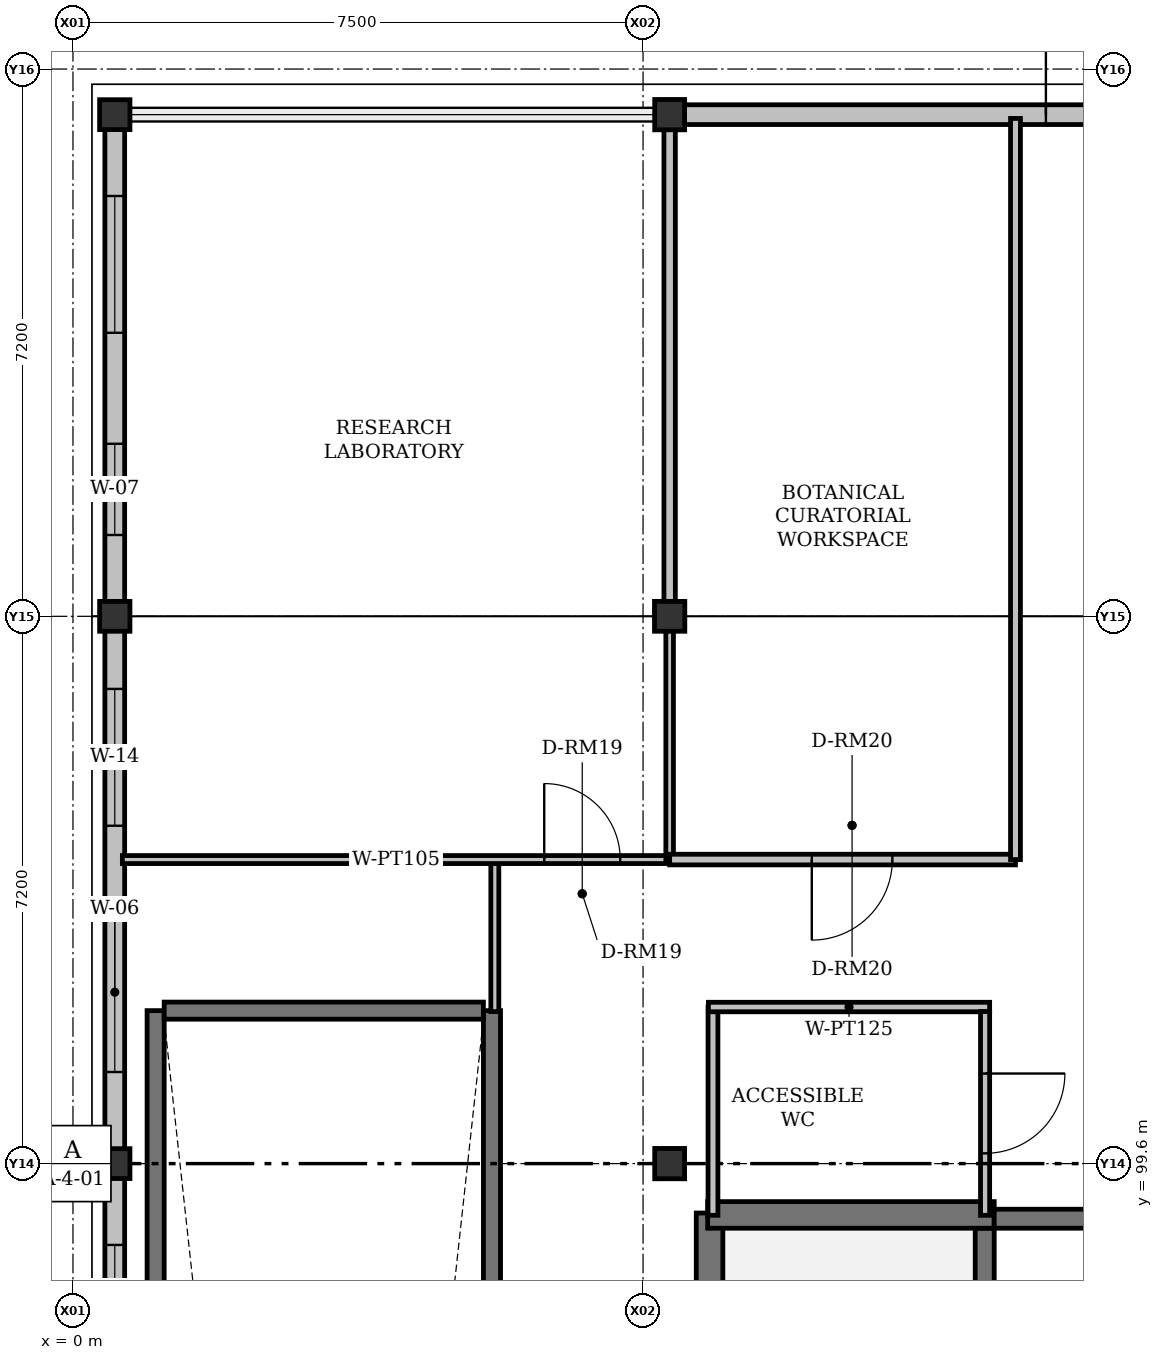
"""IFC4 building model, lengths in metres.
Left out: names, types, materials, properties, quantities, classifications, styles, units other than length and angle.
Written with IfcOpenShell. Run it as: python <this file> out.ifc"""

import sys

from ifc_helpers import new_model, si_unit, direction, frame, frame_2d, origin, origin_2d, place, context, subcontext, project, spatial, rectangle, i_section, extrude, element, fill, save


model = new_model("IFC4")
c1 = context("Model", 3, precision=1e-05, world=origin(), true_north=direction((0.0, 1.0)))
c2 = subcontext(c1, "Body", "Model", "MODEL_VIEW")
j1 = project(units=[si_unit("LENGTHUNIT", "METRE"), si_unit("PLANEANGLEUNIT", "RADIAN")], contexts=[c1])
p1 = place(None, origin())
s1 = spatial("IfcSite", under=j1, at=p1, CompositionType="ELEMENT")
p2 = place(p1, origin())
s2 = spatial("IfcBuilding", under=s1, at=p2, CompositionType="ELEMENT")
p3 = place(p2, origin())
s3 = spatial("IfcBuildingStorey", under=s2, at=p3, CompositionType="ELEMENT", Elevation=0.0)
for number, where, z_axis, x_axis in (
    (1, (0.55, 99.6, 0.0), (0.0, 0.0, 1.0), (1.0, 0.0, 0.0)),
    (2, (7.85, 99.6, 0.0), (0.0, 0.0, 1.0), (0.0, 1.0, 0.0)),
    (3, (0.55, 106.8, 0.0), (0.0, 0.0, 1.0), (1.0, 0.0, 0.0)),
    (4, (7.85, 106.8, 0.0), (0.0, 0.0, 1.0), (1.0, 0.0, 0.0)),
    (5, (0.55, 113.4, 0.0), (0.0, 0.0, 1.0), (1.0, 0.0, 0.0)),
    (6, (7.85, 113.4, 0.0), (0.0, 0.0, 1.0), (0.0, 1.0, 0.0)),
):
    element("IfcColumn", number, at=place(p3, frame(where, z_axis=z_axis, x_axis=x_axis)), inside=s3, PredefinedType="COLUMN", context=c2, shape_type="SweptSolid", body=[
        extrude(i_section(OverallWidth=0.399, OverallDepth=0.393, WebThickness=0.023, FlangeThickness=0.036, FilletRadius=0.015, at=origin_2d()), origin(), (0.0, 0.0, 1.0), 5.4),
    ])
p4 = place(p3, frame((0.55, 92.4, 0.0), z_axis=(0.0, 0.0, 1.0), x_axis=(0.0, 1.0, 0.0)))
e7 = element("IfcWall", 7, at=p4, inside=s3, PredefinedType="SOLIDWALL", context=c2, shape_type="SweptSolid", body=[
    extrude(rectangle(XDim=7.2, YDim=0.26, at=frame_2d((3.6, 0.0))), origin(), (0.0, 0.0, 1.0), 4.777),
])
p5 = place(p4, frame((1.07, 0.0, 0.92)))
e8 = element("IfcOpeningElement", 8, at=p5, cuts=e7, PredefinedType="OPENING", context=c2, shape_type="SweptSolid", body=[
    extrude(rectangle(XDim=1.8, YDim=1.4, at=frame_2d((0.9, 0.7))), frame((0.0, 0.13, 0.0), z_axis=(0.0, -1.0, 0.0), x_axis=(1.0, 0.0, 0.0)), (0.0, 0.0, 1.0), 0.26),
])
p6 = place(p4, frame((4.93, 0.0, 0.92)))
e9 = element("IfcOpeningElement", 9, at=p6, cuts=e7, PredefinedType="OPENING", context=c2, shape_type="SweptSolid", body=[
    extrude(rectangle(XDim=1.2, YDim=1.7, at=frame_2d((0.6, 0.85))), frame((0.0, 0.13, 0.0), z_axis=(0.0, -1.0, 0.0), x_axis=(1.0, 0.0, 0.0)), (0.0, 0.0, 1.0), 0.26),
])
p7 = place(p3, frame((0.55, 99.6, 0.0), z_axis=(0.0, 0.0, 1.0), x_axis=(0.0, 1.0, 0.0)))
e10 = element("IfcWall", 10, at=p7, inside=s3, PredefinedType="SOLIDWALL", context=c2, shape_type="SweptSolid", body=[
    extrude(rectangle(XDim=7.2, YDim=0.26, at=frame_2d((3.6, 0.0))), origin(), (0.0, 0.0, 1.0), 4.777),
])
p8 = place(p7, frame((1.205, 0.0, 0.92)))
e11 = element("IfcOpeningElement", 11, at=p8, cuts=e10, PredefinedType="OPENING", context=c2, shape_type="SweptSolid", body=[
    extrude(rectangle(XDim=2.1, YDim=1.4, at=frame_2d((1.05, 0.7))), frame((0.0, 0.13, 0.0), z_axis=(0.0, -1.0, 0.0), x_axis=(1.0, 0.0, 0.0)), (0.0, 0.0, 1.0), 0.26),
])
p9 = place(p7, frame((4.445, 0.0, 0.92)))
e12 = element("IfcOpeningElement", 12, at=p9, cuts=e10, PredefinedType="OPENING", context=c2, shape_type="SweptSolid", body=[
    extrude(rectangle(XDim=1.8, YDim=1.7, at=frame_2d((0.9, 0.85))), frame((0.0, 0.13, 0.0), z_axis=(0.0, -1.0, 0.0), x_axis=(1.0, 0.0, 0.0)), (0.0, 0.0, 1.0), 0.26),
])
p10 = place(p3, frame((0.55, 106.8, 0.0), z_axis=(0.0, 0.0, 1.0), x_axis=(0.0, 1.0, 0.0)))
e13 = element("IfcWall", 13, at=p10, inside=s3, PredefinedType="SOLIDWALL", context=c2, shape_type="SweptSolid", body=[
    extrude(rectangle(XDim=6.6, YDim=0.26, at=frame_2d((3.3, 0.0))), origin(), (0.0, 0.0, 1.0), 4.777),
])
p11 = place(p10, frame((1.07, 0.0, 0.92)))
e14 = element("IfcOpeningElement", 14, at=p11, cuts=e13, PredefinedType="OPENING", context=c2, shape_type="SweptSolid", body=[
    extrude(rectangle(XDim=1.2, YDim=1.55, at=frame_2d((0.6, 0.775))), frame((0.0, 0.13, 0.0), z_axis=(0.0, -1.0, 0.0), x_axis=(1.0, 0.0, 0.0)), (0.0, 0.0, 1.0), 0.26),
])
p12 = place(p10, frame((3.73, 0.0, 0.92)))
e15 = element("IfcOpeningElement", 15, at=p12, cuts=e13, PredefinedType="OPENING", context=c2, shape_type="SweptSolid", body=[
    extrude(rectangle(XDim=1.8, YDim=1.7, at=frame_2d((0.9, 0.85))), frame((0.0, 0.13, 0.0), z_axis=(0.0, -1.0, 0.0), x_axis=(1.0, 0.0, 0.0)), (0.0, 0.0, 1.0), 0.26),
])
p13 = place(p3, frame((7.85, 113.4, 0.0), z_axis=(0.0, 0.0, 1.0), x_axis=(1.0, 0.0, 0.0)))
e16 = element("IfcWall", 16, at=p13, inside=s3, PredefinedType="SOLIDWALL", context=c2, shape_type="SweptSolid", body=[
    extrude(rectangle(XDim=11.9, YDim=0.26, at=frame_2d((5.95, 0.0))), origin(), (0.0, 0.0, 1.0), 4.7),
])
p14 = place(p13, frame((4.95, 0.0, 0.0)))
e17 = element("IfcOpeningElement", 17, at=p14, cuts=e16, PredefinedType="OPENING", context=c2, shape_type="SweptSolid", body=[
    extrude(rectangle(XDim=2.0, YDim=2.4, at=frame_2d((1.0, 1.2))), frame((0.0, 0.13, 0.0), z_axis=(0.0, -1.0, 0.0), x_axis=(1.0, 0.0, 0.0)), (0.0, 0.0, 1.0), 0.26),
])
p15 = place(p3, frame((8.375, 90.775, 0.0), z_axis=(0.0, 0.0, 1.0), x_axis=(0.0, 1.0, 0.0)))
e18 = element("IfcWall", 18, at=p15, inside=s3, PredefinedType="SHEAR", context=c2, shape_type="SweptSolid", body=[
    extrude(rectangle(XDim=8.175, YDim=0.35, at=frame_2d((4.087, 0.0))), origin(), (0.0, 0.0, 1.0), 5.4),
])
p16 = place(p3, frame((11.995, 90.9, 0.0), z_axis=(0.0, 0.0, 1.0), x_axis=(0.0, 1.0, 0.0)))
e19 = element("IfcWall", 19, at=p16, inside=s3, PredefinedType="SHEAR", context=c2, shape_type="SweptSolid", body=[
    extrude(rectangle(XDim=7.85, YDim=0.25, at=frame_2d((3.925, 0.0))), origin(), (0.0, 0.0, 1.0), 5.4),
])
p17 = place(p3, frame((8.35, 98.925, 0.0), z_axis=(0.0, 0.0, 1.0), x_axis=(1.0, 0.0, 0.0)))
e20 = element("IfcWall", 20, at=p17, inside=s3, PredefinedType="SHEAR", context=c2, shape_type="SweptSolid", body=[
    extrude(rectangle(XDim=3.77, YDim=0.35, at=frame_2d((1.885, 0.0))), origin(), (0.0, 0.0, 1.0), 5.4),
])
p18 = place(p3, frame((12.12, 98.875, 0.0), z_axis=(0.0, 0.0, 1.0), x_axis=(1.0, 0.0, 0.0)))
e21 = element("IfcWall", 21, at=p18, inside=s3, PredefinedType="SHEAR", context=c2, shape_type="SweptSolid", body=[
    extrude(rectangle(XDim=4.03, YDim=0.25, at=frame_2d((2.015, 0.0))), origin(), (0.0, 0.0, 1.0), 5.4),
])
p19 = place(p18, frame((1.35, 0.0, 0.0)))
e22 = element("IfcOpeningElement", 22, at=p19, cuts=e21, PredefinedType="OPENING", context=c2, shape_type="SweptSolid", body=[
    extrude(rectangle(XDim=1.3, YDim=2.2, at=frame_2d((0.65, 1.1))), frame((0.0, 0.125, 0.0), z_axis=(0.0, -1.0, 0.0), x_axis=(1.0, 0.0, 0.0)), (0.0, 0.0, 1.0), 0.25),
])
for number, where, z_axis, x_axis in (
    (23, (1.087, 63.1, 0.0), (0.0, 0.0, 1.0), (0.0, 1.0, 0.0)),
    (24, (5.512, 63.1, 0.0), (0.0, 0.0, 1.0), (0.0, 1.0, 0.0)),
):
    element("IfcWall", number, at=place(p3, frame(where, z_axis=z_axis, x_axis=x_axis)), inside=s3, PredefinedType="SHEAR", context=c2, shape_type="SweptSolid", body=[
        extrude(rectangle(XDim=38.512, YDim=0.225, at=frame_2d((19.256, 0.0))), origin(), (0.0, 0.0, 1.0), 4.65),
    ])
p20 = place(p3, frame((1.2, 101.613, 0.0), z_axis=(0.0, 0.0, 1.0), x_axis=(1.0, 0.0, 0.0)))
e25 = element("IfcWall", 25, at=p20, inside=s3, PredefinedType="SHEAR", context=c2, shape_type="SweptSolid", body=[
    extrude(rectangle(XDim=4.2, YDim=0.225, at=frame_2d((2.1, 0.0))), origin(), (0.0, 0.0, 1.0), 4.65),
])
p21 = place(p3, frame((8.42, 98.92, 0.0), z_axis=(0.0, 0.0, 1.0), x_axis=(0.0, 1.0, 0.0)))
e26 = element("IfcWall", 26, at=p21, inside=s3, PredefinedType="PARTITIONING", context=c2, shape_type="SweptSolid", body=[
    extrude(rectangle(XDim=2.74, YDim=0.13, at=frame_2d((1.37, 0.0))), origin(), (0.0, 0.0, 1.0), 4.651),
])
p22 = place(p3, frame((8.36, 101.66, 0.0), z_axis=(0.0, 0.0, 1.0), x_axis=(1.0, 0.0, 0.0)))
e27 = element("IfcWall", 27, at=p22, inside=s3, PredefinedType="PARTITIONING", context=c2, shape_type="SweptSolid", body=[
    extrude(rectangle(XDim=3.7, YDim=0.125, at=frame_2d((1.85, 0.0))), origin(), (0.0, 0.0, 1.0), 5.15),
])
p23 = place(p3, frame((12.0, 101.6, 0.0), z_axis=(0.0, 0.0, 1.0), x_axis=(0.0, -1.0, 0.0)))
e28 = element("IfcWall", 28, at=p23, inside=s3, PredefinedType="PARTITIONING", context=c2, shape_type="SweptSolid", body=[
    extrude(rectangle(XDim=2.68, YDim=0.12, at=frame_2d((1.34, 0.0))), origin(), (0.0, 0.0, 1.0), 4.651),
])
p24 = place(p23, frame((0.815, 0.0, 0.0)))
e29 = element("IfcOpeningElement", 29, at=p24, cuts=e28, PredefinedType="OPENING", context=c2, shape_type="SweptSolid", body=[
    extrude(rectangle(XDim=1.05, YDim=2.1, at=frame_2d((0.525, 1.05))), frame((0.0, 0.06, 0.0), z_axis=(0.0, -1.0, 0.0), x_axis=(1.0, 0.0, 0.0)), (0.0, 0.0, 1.0), 0.12),
])
p25 = place(p3, frame((5.55, 101.6, 0.0), z_axis=(0.0, 0.0, 1.0), x_axis=(0.0, 1.0, 0.0)))
e30 = element("IfcWall", 30, at=p25, inside=s3, PredefinedType="PARTITIONING", context=c2, shape_type="SweptSolid", body=[
    extrude(rectangle(XDim=2.0, YDim=0.105, at=frame_2d((1.0, 0.0))), origin(), (0.0, 0.0, 1.0), 4.877),
])
p26 = place(p3, frame((0.65, 103.6, 0.0), z_axis=(0.0, 0.0, 1.0), x_axis=(1.0, 0.0, 0.0)))
e31 = element("IfcWall", 31, at=p26, inside=s3, PredefinedType="PARTITIONING", context=c2, shape_type="SweptSolid", body=[
    extrude(rectangle(XDim=7.2, YDim=0.105, at=frame_2d((3.6, 0.0))), origin(), (0.0, 0.0, 1.0), 4.727),
])
p27 = place(p26, frame((5.55, 0.0, 0.0)))
e32 = element("IfcOpeningElement", 32, at=p27, cuts=e31, PredefinedType="OPENING", context=c2, shape_type="SweptSolid", body=[
    extrude(rectangle(XDim=1.0, YDim=2.25, at=frame_2d((0.5, 1.125))), frame((0.0, 0.052, 0.0), z_axis=(0.0, -1.0, 0.0), x_axis=(1.0, 0.0, 0.0)), (0.0, 0.0, 1.0), 0.105),
])
p28 = place(p3, frame((7.85, 103.6, 0.0), z_axis=(0.0, 0.0, 1.0), x_axis=(0.0, 1.0, 0.0)))
e33 = element("IfcWall", 33, at=p28, inside=s3, PredefinedType="PARTITIONING", context=c2, shape_type="SweptSolid", body=[
    extrude(rectangle(XDim=3.008, YDim=0.1, at=frame_2d((1.504, 0.0))), origin(), (0.0, 0.0, 1.0), 4.727),
])
p29 = place(p3, frame((7.85, 106.991, 0.0), z_axis=(0.0, 0.0, 1.0), x_axis=(0.0, 1.0, 0.0)))
e34 = element("IfcWall", 34, at=p29, inside=s3, PredefinedType="PARTITIONING", context=c2, shape_type="SweptSolid", body=[
    extrude(rectangle(XDim=6.359, YDim=0.15, at=frame_2d((3.179, 0.0))), origin(), (0.0, 0.0, 1.0), 4.727),
])
p30 = place(p3, frame((12.4, 103.6, 0.0), z_axis=(0.0, 0.0, 1.0), x_axis=(-1.0, 0.0, 0.0)))
e35 = element("IfcWall", 35, at=p30, inside=s3, PredefinedType="PARTITIONING", context=c2, shape_type="SweptSolid", body=[
    extrude(rectangle(XDim=4.55, YDim=0.14, at=frame_2d((2.275, 0.0))), origin(), (0.0, 0.0, 1.0), 4.727),
])
p31 = place(p30, frame((1.62, 0.0, 0.0)))
e36 = element("IfcOpeningElement", 36, at=p31, cuts=e35, PredefinedType="OPENING", context=c2, shape_type="SweptSolid", body=[
    extrude(rectangle(XDim=1.06, YDim=2.25, at=frame_2d((0.53, 1.125))), frame((0.0, 0.07, 0.0), z_axis=(0.0, -1.0, 0.0), x_axis=(1.0, 0.0, 0.0)), (0.0, 0.0, 1.0), 0.14),
])
p32 = place(p3, frame((12.4, 113.35, 0.0), z_axis=(0.0, 0.0, 1.0), x_axis=(0.0, -1.0, 0.0)))
e37 = element("IfcWall", 37, at=p32, inside=s3, PredefinedType="PARTITIONING", context=c2, shape_type="SweptSolid", body=[
    extrude(rectangle(XDim=9.75, YDim=0.13, at=frame_2d((4.875, 0.0))), origin(), (0.0, 0.0, 1.0), 4.651),
])
p33 = place(p6, origin())
e38 = element("IfcWindow", 38, at=p33, inside=s3, PartitioningType="SINGLE_PANEL", PredefinedType="WINDOW", context=c2, shape_type="SweptSolid", body=[
    extrude(rectangle(XDim=1.2, YDim=1.7, at=frame_2d((0.6, 0.85))), frame((0.0, 0.03, 0.0), z_axis=(0.0, -1.0, 0.0), x_axis=(1.0, 0.0, 0.0)), (0.0, 0.0, 1.0), 0.06),
])
fill(e9, e38)
p34 = place(p8, origin())
e39 = element("IfcWindow", 39, at=p34, inside=s3, PartitioningType="DOUBLE_PANEL_VERTICAL", PredefinedType="WINDOW", context=c2, shape_type="SweptSolid", body=[
    extrude(rectangle(XDim=2.1, YDim=1.4, at=frame_2d((1.05, 0.7))), frame((0.0, 0.03, 0.0), z_axis=(0.0, -1.0, 0.0), x_axis=(1.0, 0.0, 0.0)), (0.0, 0.0, 1.0), 0.06),
])
fill(e11, e39)
p35 = place(p9, origin())
e40 = element("IfcWindow", 40, at=p35, inside=s3, PartitioningType="DOUBLE_PANEL_VERTICAL", PredefinedType="WINDOW", context=c2, shape_type="SweptSolid", body=[
    extrude(rectangle(XDim=1.8, YDim=1.7, at=frame_2d((0.9, 0.85))), frame((0.0, 0.03, 0.0), z_axis=(0.0, -1.0, 0.0), x_axis=(1.0, 0.0, 0.0)), (0.0, 0.0, 1.0), 0.06),
])
fill(e12, e40)
p36 = place(p11, origin())
e41 = element("IfcWindow", 41, at=p36, inside=s3, PartitioningType="SINGLE_PANEL", PredefinedType="WINDOW", context=c2, shape_type="SweptSolid", body=[
    extrude(rectangle(XDim=1.2, YDim=1.55, at=frame_2d((0.6, 0.775))), frame((0.0, 0.03, 0.0), z_axis=(0.0, -1.0, 0.0), x_axis=(1.0, 0.0, 0.0)), (0.0, 0.0, 1.0), 0.06),
])
fill(e14, e41)
p37 = place(p12, origin())
e42 = element("IfcWindow", 42, at=p37, inside=s3, PartitioningType="DOUBLE_PANEL_VERTICAL", PredefinedType="WINDOW", context=c2, shape_type="SweptSolid", body=[
    extrude(rectangle(XDim=1.8, YDim=1.7, at=frame_2d((0.9, 0.85))), frame((0.0, 0.03, 0.0), z_axis=(0.0, -1.0, 0.0), x_axis=(1.0, 0.0, 0.0)), (0.0, 0.0, 1.0), 0.06),
])
fill(e15, e42)
p38 = place(p14, origin())
e43 = element("IfcDoor", 43, at=p38, inside=s3, OperationType="DOUBLE_DOOR_SINGLE_SWING", PredefinedType="DOOR", context=c2, shape_type="SweptSolid", body=[
    extrude(rectangle(XDim=2.0, YDim=2.4, at=frame_2d((1.0, 1.2))), frame((0.0, 0.025, 0.0), z_axis=(0.0, -1.0, 0.0), x_axis=(1.0, 0.0, 0.0)), (0.0, 0.0, 1.0), 0.05),
])
fill(e17, e43)
p39 = place(p24, origin())
e44 = element("IfcDoor", 44, at=p39, inside=s3, OperationType="SINGLE_SWING_LEFT", PredefinedType="DOOR", context=c2, shape_type="SweptSolid", body=[
    extrude(rectangle(XDim=1.05, YDim=2.1, at=frame_2d((0.525, 1.05))), frame((0.0, 0.025, 0.0), z_axis=(0.0, -1.0, 0.0), x_axis=(1.0, 0.0, 0.0)), (0.0, 0.0, 1.0), 0.05),
])
fill(e29, e44)
p40 = place(p27, origin())
e45 = element("IfcDoor", 45, at=p40, inside=s3, OperationType="SINGLE_SWING_LEFT", PredefinedType="DOOR", context=c2, shape_type="SweptSolid", body=[
    extrude(rectangle(XDim=1.0, YDim=2.25, at=frame_2d((0.5, 1.125))), frame((0.0, 0.025, 0.0), z_axis=(0.0, -1.0, 0.0), x_axis=(1.0, 0.0, 0.0)), (0.0, 0.0, 1.0), 0.05),
])
fill(e32, e45)
p41 = place(p31, origin())
e46 = element("IfcDoor", 46, at=p41, inside=s3, OperationType="SINGLE_SWING_RIGHT", PredefinedType="DOOR", context=c2, shape_type="SweptSolid", body=[
    extrude(rectangle(XDim=1.06, YDim=2.25, at=frame_2d((0.53, 1.125))), frame((0.0, 0.025, 0.0), z_axis=(0.0, -1.0, 0.0), x_axis=(1.0, 0.0, 0.0)), (0.0, 0.0, 1.0), 0.05),
])
fill(e36, e46)
save(model, sys.argv[1])
